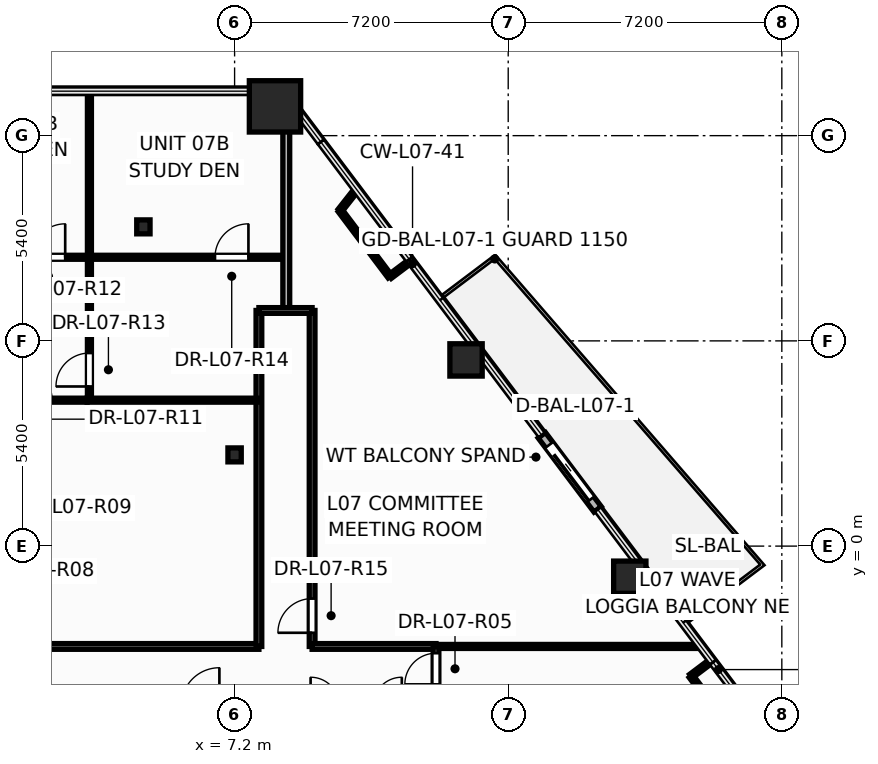
"""IFC4 building model, lengths in metres.
Left out: names, types, materials, properties, quantities, classifications, styles, units other than length and angle.
Written with IfcOpenShell. Run it as: python <this file> out.ifc"""

import sys

from ifc_helpers import new_model, si_unit, direction, frame, frame_2d, origin, origin_2d, place, context, subcontext, project, spatial, rectangle, hollow_rectangle, hollow_circle, i_section, extrude, element, fill, save


model = new_model("IFC4")
c1 = context("Model", 3, precision=1e-05, world=origin(), true_north=direction((0.0, 1.0)))
c2 = subcontext(c1, "Body", "Model", "MODEL_VIEW")
j1 = project(units=[si_unit("LENGTHUNIT", "METRE"), si_unit("PLANEANGLEUNIT", "RADIAN")], contexts=[c1])
p1 = place(None, origin())
s1 = spatial("IfcSite", under=j1, at=p1, CompositionType="ELEMENT")
p2 = place(p1, origin())
s2 = spatial("IfcBuilding", under=s1, at=p2, CompositionType="ELEMENT")
p3 = place(p2, frame((0.0, 0.0, 31.5)))
s3 = spatial("IfcBuildingStorey", under=s2, at=p3, CompositionType="ELEMENT", Elevation=31.5)
p4 = place(p3, frame((8.263, 11.57, 0.0), z_axis=(0.0, 0.0, 1.0), x_axis=(1.0, 0.0, 0.0)))
e1 = element("IfcColumn", 1, at=p4, inside=s3, PredefinedType="COLUMN", context=c2, shape_type="SweptSolid", body=[
    extrude(hollow_rectangle(XDim=1.35, YDim=1.35, WallThickness=0.065, at=origin_2d()), origin(), (0.0, 0.0, 1.0), 3.6),
])
for number, where, z_axis, x_axis in (
    (2, (17.599, -0.819, 0.0), (0.0, 0.0, 1.0), (1.0, 0.0, 0.0)),
    (3, (13.29, 4.899, 0.0), (0.0, 0.0, 1.0), (1.0, 0.0, 0.0)),
):
    element("IfcColumn", number, at=place(p3, frame(where, z_axis=z_axis, x_axis=x_axis)), inside=s3, PredefinedType="COLUMN", context=c2, shape_type="SweptSolid", body=[
        extrude(hollow_circle(Radius=0.425, WallThickness=0.038, at=origin_2d()), origin(), (0.0, 0.0, 1.0), 3.6),
    ])
for number, where, z_axis, x_axis in (
    (4, (7.2, 2.4, 0.0), (0.0, 0.0, 1.0), (1.0, 0.0, 0.0)),
    (5, (4.8, 8.4, 0.0), (0.0, 0.0, 1.0), (1.0, 0.0, 0.0)),
):
    element("IfcColumn", number, at=place(p3, frame(where, z_axis=z_axis, x_axis=x_axis)), inside=s3, PredefinedType="COLUMN", context=c2, shape_type="SweptSolid", body=[
        extrude(i_section(OverallWidth=0.35, OverallDepth=0.367, WebThickness=0.025, FlangeThickness=0.032, at=origin_2d()), origin(), (0.0, 0.0, 1.0), 3.6),
    ])
p5 = place(p3, frame((16.753, 0.969, -0.015), z_axis=(0.0, 0.0, 1.0), x_axis=(-0.601871511513, 0.798592939882, 0.0)))
e6 = element("IfcWall", 6, at=p5, inside=s3, PredefinedType="STANDARD", context=c2, shape_type="SweptSolid", body=[
    extrude(rectangle(XDim=2.44, YDim=0.24, at=frame_2d((1.22, 0.0))), origin(), (0.0, 0.0, 1.0), 2.728),
])
p6 = place(p5, frame((0.32, 0.0, 0.015)))
e7 = element("IfcOpeningElement", 7, at=p6, cuts=e6, PredefinedType="OPENING", context=c2, shape_type="SweptSolid", body=[
    extrude(rectangle(XDim=1.806, YDim=2.204, at=frame_2d((0.9, 1.102))), frame((0.0, 0.13, 0.0), z_axis=(0.0, -1.0, 0.0), x_axis=(1.0, 0.0, 0.0)), (0.0, 0.0, 1.0), 0.26),
])
p7 = place(p3, frame((9.24, -2.64, 0.0), z_axis=(0.0, 0.0, 1.0), x_axis=(0.0, 1.0, 0.0)))
e8 = element("IfcWall", 8, at=p7, inside=s3, PredefinedType="PARTITIONING", context=c2, shape_type="SweptSolid", body=[
    extrude(rectangle(XDim=8.84, YDim=0.15, at=frame_2d((4.42, 0.0))), origin(), (0.0, 0.0, 1.0), 2.509),
])
p8 = place(p7, frame((0.359, 0.0, 0.0)))
e9 = element("IfcOpeningElement", 9, at=p8, cuts=e8, PredefinedType="OPENING", context=c2, shape_type="SweptSolid", body=[
    extrude(rectangle(XDim=0.906, YDim=2.104, at=frame_2d((0.45, 1.052))), frame((0.0, 0.085, 0.0), z_axis=(0.0, -1.0, 0.0), x_axis=(1.0, 0.0, 0.0)), (0.0, 0.0, 1.0), 0.17),
])
p9 = place(p3, frame((0.74, -2.64, 0.0), z_axis=(0.0, 0.0, 1.0), x_axis=(1.0, 0.0, 0.0)))
e10 = element("IfcWall", 10, at=p9, inside=s3, PredefinedType="PARTITIONING", context=c2, shape_type="SweptSolid", body=[
    extrude(rectangle(XDim=7.1, YDim=0.15, at=frame_2d((3.55, 0.0))), origin(), (0.0, 0.0, 1.0), 2.325),
])
p10 = place(p9, frame((0.72, 0.0, 0.0)))
e11 = element("IfcOpeningElement", 11, at=p10, cuts=e10, PredefinedType="OPENING", context=c2, shape_type="SweptSolid", body=[
    extrude(rectangle(XDim=0.906, YDim=2.104, at=frame_2d((0.45, 1.052))), frame((0.0, 0.085, 0.0), z_axis=(0.0, -1.0, 0.0), x_axis=(1.0, 0.0, 0.0)), (0.0, 0.0, 1.0), 0.17),
])
p11 = place(p3, frame((12.5, -2.64, 0.0), z_axis=(0.0, 0.0, 1.0), x_axis=(1.0, 0.0, 0.0)))
e12 = element("IfcWall", 12, at=p11, inside=s3, PredefinedType="PARTITIONING", context=c2, shape_type="SweptSolid", body=[
    extrude(rectangle(XDim=6.972, YDim=0.105, at=frame_2d((3.486, 0.0))), origin(), (0.0, 0.0, 1.0), 2.713),
])
p12 = place(p3, frame((7.84, -2.64, 0.0), z_axis=(0.0, 0.0, 1.0), x_axis=(0.0, 1.0, 0.0)))
e13 = element("IfcWall", 13, at=p12, inside=s3, PredefinedType="PARTITIONING", context=c2, shape_type="SweptSolid", body=[
    extrude(rectangle(XDim=8.84, YDim=0.15, at=frame_2d((4.42, 0.0))), origin(), (0.0, 0.0, 1.0), 2.509),
])
p13 = place(p3, frame((3.38, 7.6, 0.0), z_axis=(0.0, 0.0, 1.0), x_axis=(1.0, 0.0, 0.0)))
e14 = element("IfcWall", 14, at=p13, inside=s3, PredefinedType="PARTITIONING", context=c2, shape_type="SweptSolid", body=[
    extrude(rectangle(XDim=5.18, YDim=0.105, at=frame_2d((2.59, 0.0))), origin(), (0.0, 0.0, 1.0), 2.509),
])
p14 = place(p13, frame((3.304, 0.0, 0.0)))
e15 = element("IfcOpeningElement", 15, at=p14, cuts=e14, PredefinedType="OPENING", context=c2, shape_type="SweptSolid", body=[
    extrude(rectangle(XDim=0.886, YDim=2.104, at=frame_2d((0.44, 1.052))), frame((0.0, 0.062, 0.0), z_axis=(0.0, -1.0, 0.0), x_axis=(1.0, 0.0, 0.0)), (0.0, 0.0, 1.0), 0.125),
])
p15 = place(p3, frame((-1.8, 7.6, 0.0), z_axis=(0.0, 0.0, 1.0), x_axis=(1.0, 0.0, 0.0)))
e16 = element("IfcWall", 16, at=p15, inside=s3, PredefinedType="PARTITIONING", context=c2, shape_type="SweptSolid", body=[
    extrude(rectangle(XDim=5.18, YDim=0.105, at=frame_2d((2.59, 0.0))), origin(), (0.0, 0.0, 1.0), 2.325),
])
p16 = place(p15, frame((3.663, 0.0, 0.0)))
e17 = element("IfcOpeningElement", 17, at=p16, cuts=e16, PredefinedType="OPENING", context=c2, shape_type="SweptSolid", body=[
    extrude(rectangle(XDim=0.886, YDim=2.104, at=frame_2d((0.44, 1.052))), frame((0.0, 0.062, 0.0), z_axis=(0.0, -1.0, 0.0), x_axis=(1.0, 0.0, 0.0)), (0.0, 0.0, 1.0), 0.125),
])
p17 = place(p3, frame((3.32, 3.84, 0.0), z_axis=(0.0, 0.0, 1.0), x_axis=(1.0, 0.0, 0.0)))
e18 = element("IfcWall", 18, at=p17, inside=s3, PredefinedType="PARTITIONING", context=c2, shape_type="SweptSolid", body=[
    extrude(rectangle(XDim=4.52, YDim=0.105, at=frame_2d((2.26, 0.0))), origin(), (0.0, 0.0, 1.0), 2.509),
])
p18 = place(p3, frame((3.38, 7.6, 0.0), z_axis=(0.0, 0.0, 1.0), x_axis=(0.0, 1.0, 0.0)))
e19 = element("IfcWall", 19, at=p18, inside=s3, PredefinedType="PARTITIONING", context=c2, shape_type="SweptSolid", body=[
    extrude(rectangle(XDim=4.37, YDim=0.105, at=frame_2d((2.185, 0.0))), origin(), (0.0, 0.0, 1.0), 2.509),
])
p19 = place(p3, frame((8.56, 6.2, 0.0), z_axis=(0.0, 0.0, 1.0), x_axis=(0.0, 1.0, 0.0)))
e20 = element("IfcWall", 20, at=p19, inside=s3, PredefinedType="PARTITIONING", context=c2, shape_type="SweptSolid", body=[
    extrude(rectangle(XDim=5.641, YDim=0.18, at=frame_2d((2.821, 0.0))), origin(), (0.0, 0.0, 1.0), 2.509),
])
p20 = place(p3, frame((3.38, 3.84, 0.0), z_axis=(0.0, 0.0, 1.0), x_axis=(0.0, 1.0, 0.0)))
e21 = element("IfcWall", 21, at=p20, inside=s3, PredefinedType="PARTITIONING", context=c2, shape_type="SweptSolid", body=[
    extrude(rectangle(XDim=3.76, YDim=0.105, at=frame_2d((1.88, 0.0))), origin(), (0.0, 0.0, 1.0), 3.35),
])
p21 = place(p20, frame((0.36, 0.0, 0.0)))
e22 = element("IfcOpeningElement", 22, at=p21, cuts=e21, PredefinedType="OPENING", context=c2, shape_type="SweptSolid", body=[
    extrude(rectangle(XDim=0.886, YDim=2.104, at=frame_2d((0.44, 1.052))), frame((0.0, 0.062, 0.0), z_axis=(0.0, -1.0, 0.0), x_axis=(1.0, 0.0, 0.0)), (0.0, 0.0, 1.0), 0.125),
])
p22 = place(p3, frame((9.24, -2.64, 0.0), z_axis=(0.0, 0.0, 1.0), x_axis=(1.0, 0.0, 0.0)))
e23 = element("IfcWall", 23, at=p22, inside=s3, PredefinedType="PARTITIONING", context=c2, shape_type="SweptSolid", body=[
    extrude(rectangle(XDim=3.26, YDim=0.15, at=frame_2d((1.63, 0.0))), origin(), (0.0, 0.0, 1.0), 3.35),
])
p23 = place(p3, frame((0.8, 3.84, 0.0), z_axis=(0.0, 0.0, 1.0), x_axis=(1.0, 0.0, 0.0)))
e24 = element("IfcWall", 24, at=p23, inside=s3, PredefinedType="PARTITIONING", context=c2, shape_type="SweptSolid", body=[
    extrude(rectangle(XDim=2.518, YDim=0.105, at=frame_2d((1.259, 0.0))), origin(), (0.0, 0.0, 1.0), 2.919),
])
p24 = place(p23, frame((0.72, 0.0, 0.0)))
e25 = element("IfcOpeningElement", 25, at=p24, cuts=e24, PredefinedType="OPENING", context=c2, shape_type="SweptSolid", body=[
    extrude(rectangle(XDim=0.886, YDim=2.104, at=frame_2d((0.44, 1.052))), frame((0.0, 0.062, 0.0), z_axis=(0.0, -1.0, 0.0), x_axis=(1.0, 0.0, 0.0)), (0.0, 0.0, 1.0), 0.125),
])
for number, where, z_axis, x_axis in (
    (26, (11.287, 7.092, 0.0), (0.0, 0.0, 1.0), (-0.602, 0.799, 0.0)),
    (27, (20.522, -5.163, 0.0), (0.0, 0.0, 1.0), (-0.602, 0.799, 0.0)),
):
    element("IfcWall", number, at=place(p3, frame(where, z_axis=z_axis, x_axis=x_axis)), inside=s3, PredefinedType="PARTITIONING", context=c2, shape_type="SweptSolid", body=[
        extrude(rectangle(XDim=2.18, YDim=0.12, at=frame_2d((1.09, 0.0))), origin(), (0.0, 0.0, 1.0), 3.35),
    ])
p25 = place(p3, frame((12.5, -4.24, 0.0), z_axis=(0.0, 0.0, 1.0), x_axis=(0.0, 1.0, 0.0)))
e28 = element("IfcWall", 28, at=p25, inside=s3, PredefinedType="PARTITIONING", context=c2, shape_type="SweptSolid", body=[
    extrude(rectangle(XDim=1.6, YDim=0.15, at=frame_2d((0.8, 0.0))), origin(), (0.0, 0.0, 1.0), 2.325),
])
p26 = place(p25, frame((0.602, 0.0, 0.0)))
e29 = element("IfcOpeningElement", 29, at=p26, cuts=e28, PredefinedType="OPENING", context=c2, shape_type="SweptSolid", body=[
    extrude(rectangle(XDim=0.826, YDim=2.104, at=frame_2d((0.41, 1.052))), frame((0.0, 0.085, 0.0), z_axis=(0.0, -1.0, 0.0), x_axis=(1.0, 0.0, 0.0)), (0.0, 0.0, 1.0), 0.17),
])
p27 = place(p3, frame((7.84, 6.2, 0.0), z_axis=(0.0, 0.0, 1.0), x_axis=(1.0, 0.0, 0.0)))
e30 = element("IfcWall", 30, at=p27, inside=s3, PredefinedType="PARTITIONING", context=c2, shape_type="SweptSolid", body=[
    extrude(rectangle(XDim=1.4, YDim=0.15, at=frame_2d((0.7, 0.0))), origin(), (0.0, 0.0, 1.0), 3.35),
])
p28 = place(p3, frame((9.976, 8.833, 0.0), z_axis=(0.0, 0.0, 1.0), x_axis=(0.618661415425, 0.785657720044, 0.0)))
e31 = element("IfcWall", 31, at=p28, inside=s3, PredefinedType="PARTITIONING", context=c2, shape_type="SweptSolid", body=[
    extrude(rectangle(XDim=0.693, YDim=0.12, at=frame_2d((0.346, 0.0))), origin(), (0.0, 0.0, 1.0), 2.713),
])
p29 = place(p3, frame((11.823, 7.495, 0.0), z_axis=(0.0, 0.0, 1.0), x_axis=(-0.798773936271, -0.601631281379, 0.0)))
e32 = element("IfcWall", 32, at=p29, inside=s3, PredefinedType="PARTITIONING", context=c2, shape_type="SweptSolid", body=[
    extrude(rectangle(XDim=0.67, YDim=0.12, at=frame_2d((0.335, 0.0))), origin(), (0.0, 0.0, 1.0), 2.713),
])
p30 = place(p3, frame((19.21, -3.422, 0.0), z_axis=(0.0, 0.0, 1.0), x_axis=(0.798598820081, 0.601863709294, 0.0)))
e33 = element("IfcWall", 33, at=p30, inside=s3, PredefinedType="PARTITIONING", context=c2, shape_type="SweptSolid", body=[
    extrude(rectangle(XDim=0.67, YDim=0.12, at=frame_2d((0.335, 0.0))), origin(), (0.0, 0.0, 1.0), 2.713),
])
p31 = place(p6, origin())
e34 = element("IfcDoor", 34, at=p31, inside=s3, OperationType="SLIDING_TO_LEFT", PredefinedType="DOOR", context=c2, shape_type="SweptSolid", body=[
    extrude(rectangle(XDim=1.8, YDim=2.2, at=frame_2d((0.9, 1.1))), frame((0.0, 0.025, 0.0), z_axis=(0.0, -1.0, 0.0), x_axis=(1.0, 0.0, 0.0)), (0.0, 0.0, 1.0), 0.05),
])
fill(e7, e34)
p32 = place(p26, origin())
e35 = element("IfcDoor", 35, at=p32, inside=s3, OperationType="SINGLE_SWING_LEFT", PredefinedType="DOOR", context=c2, shape_type="SweptSolid", body=[
    extrude(rectangle(XDim=0.82, YDim=2.1, at=frame_2d((0.41, 1.05))), frame((0.0, 0.025, 0.0), z_axis=(0.0, -1.0, 0.0), x_axis=(1.0, 0.0, 0.0)), (0.0, 0.0, 1.0), 0.05),
])
fill(e29, e35)
p33 = place(p24, origin())
e36 = element("IfcDoor", 36, at=p33, inside=s3, OperationType="SINGLE_SWING_LEFT", PredefinedType="DOOR", context=c2, shape_type="SweptSolid", body=[
    extrude(rectangle(XDim=0.88, YDim=2.1, at=frame_2d((0.44, 1.05))), frame((0.0, 0.025, 0.0), z_axis=(0.0, -1.0, 0.0), x_axis=(1.0, 0.0, 0.0)), (0.0, 0.0, 1.0), 0.05),
])
fill(e25, e36)
p34 = place(p16, origin())
e37 = element("IfcDoor", 37, at=p34, inside=s3, OperationType="SINGLE_SWING_RIGHT", PredefinedType="DOOR", context=c2, shape_type="SweptSolid", body=[
    extrude(rectangle(XDim=0.88, YDim=2.1, at=frame_2d((0.44, 1.05))), frame((0.0, 0.025, 0.0), z_axis=(0.0, -1.0, 0.0), x_axis=(1.0, 0.0, 0.0)), (0.0, 0.0, 1.0), 0.05),
])
fill(e17, e37)
p35 = place(p21, origin())
e38 = element("IfcDoor", 38, at=p35, inside=s3, OperationType="SINGLE_SWING_LEFT", PredefinedType="DOOR", context=c2, shape_type="SweptSolid", body=[
    extrude(rectangle(XDim=0.88, YDim=2.1, at=frame_2d((0.44, 1.05))), frame((0.0, 0.025, 0.0), z_axis=(0.0, -1.0, 0.0), x_axis=(1.0, 0.0, 0.0)), (0.0, 0.0, 1.0), 0.05),
])
fill(e22, e38)
p36 = place(p14, origin())
e39 = element("IfcDoor", 39, at=p36, inside=s3, OperationType="SINGLE_SWING_RIGHT", PredefinedType="DOOR", context=c2, shape_type="SweptSolid", body=[
    extrude(rectangle(XDim=0.88, YDim=2.1, at=frame_2d((0.44, 1.05))), frame((0.0, 0.025, 0.0), z_axis=(0.0, -1.0, 0.0), x_axis=(1.0, 0.0, 0.0)), (0.0, 0.0, 1.0), 0.05),
])
fill(e15, e39)
p37 = place(p8, origin())
e40 = element("IfcDoor", 40, at=p37, inside=s3, OperationType="SINGLE_SWING_LEFT", PredefinedType="DOOR", context=c2, shape_type="SweptSolid", body=[
    extrude(rectangle(XDim=0.9, YDim=2.1, at=frame_2d((0.45, 1.05))), frame((0.0, 0.025, 0.0), z_axis=(0.0, -1.0, 0.0), x_axis=(1.0, 0.0, 0.0)), (0.0, 0.0, 1.0), 0.05),
])
fill(e9, e40)
save(model, sys.argv[1])
